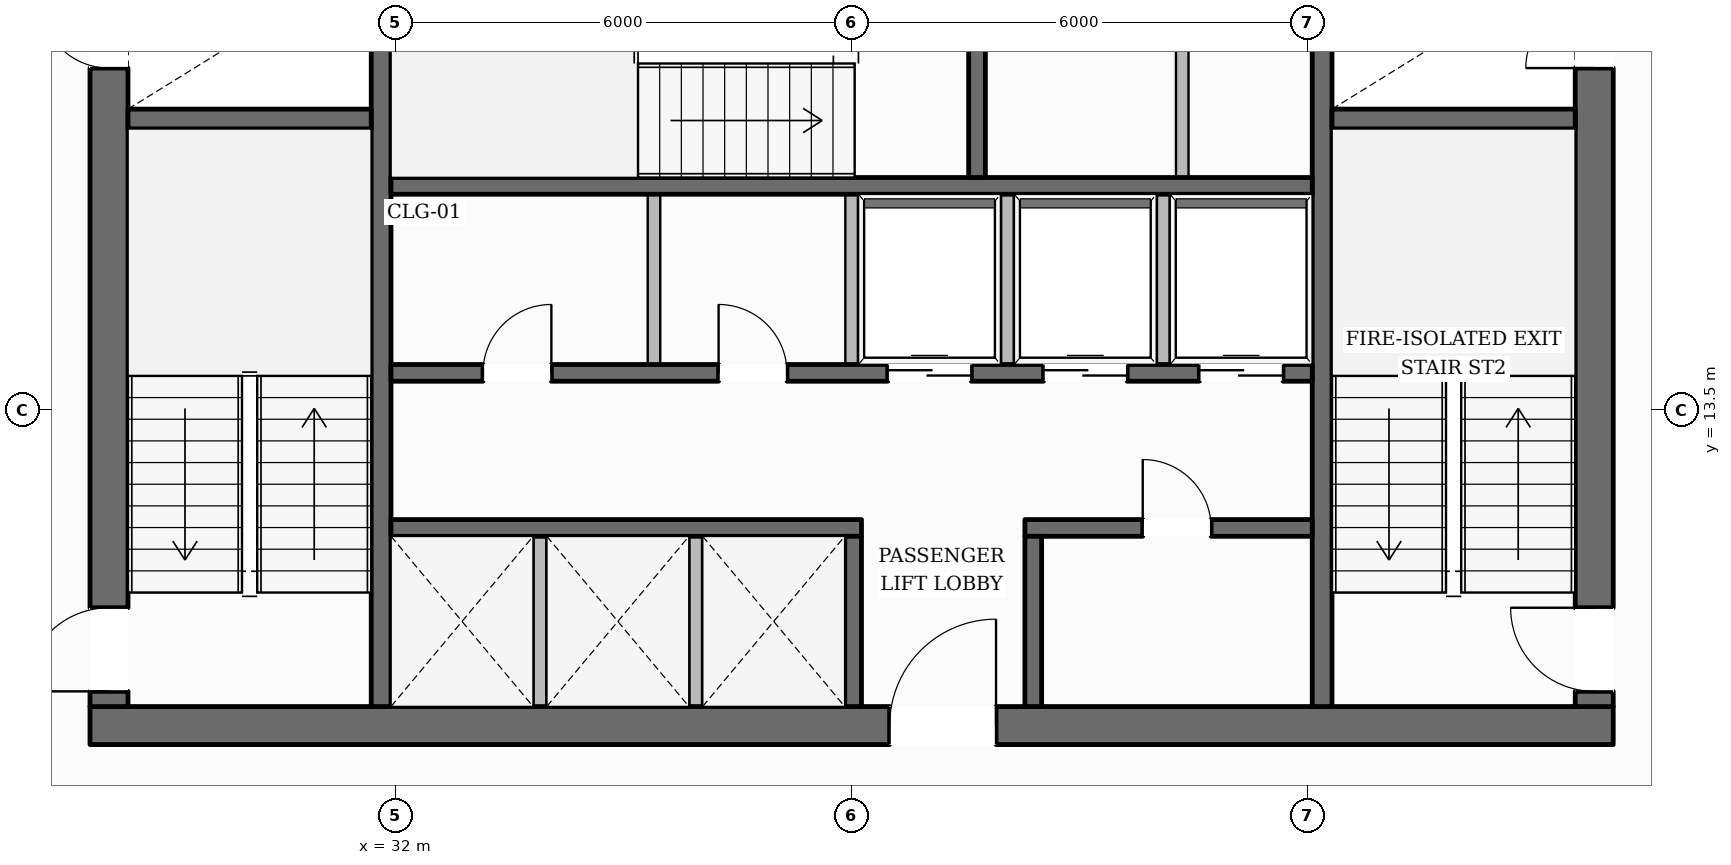
"""IFC4 building model, lengths in metres.
Left out: names, types, materials, properties, quantities, classifications, styles, units other than length and angle.
Written with IfcOpenShell. Run it as: python <this file> out.ifc"""

import sys

from ifc_helpers import new_model, si_unit, direction, frame, frame_2d, origin, place, context, subcontext, project, spatial, rectangle, extrude, element, fill, save


model = new_model("IFC4")
c1 = context("Model", 3, precision=1e-05, world=origin(), true_north=direction((0.0, 1.0)))
c2 = subcontext(c1, "Body", "Model", "MODEL_VIEW")
j1 = project(units=[si_unit("LENGTHUNIT", "METRE"), si_unit("PLANEANGLEUNIT", "RADIAN")], contexts=[c1])
p1 = place(None, origin())
s1 = spatial("IfcSite", under=j1, at=p1, CompositionType="ELEMENT")
p2 = place(p1, origin())
s2 = spatial("IfcBuilding", under=s1, at=p2, CompositionType="ELEMENT")
p3 = place(p2, frame((0.0, 0.0, 116.3)))
s3 = spatial("IfcBuildingStorey", under=s2, at=p3, CompositionType="ELEMENT", Elevation=116.3)
p4 = place(p3, frame((27.98, 9.35, 0.0), z_axis=(0.0, 0.0, 1.0), x_axis=(1.0, 0.0, 0.0)))
e1 = element("IfcWall", 1, at=p4, inside=s3, PredefinedType="SOLIDWALL", context=c2, shape_type="SweptSolid", body=[
    extrude(rectangle(XDim=20.04, YDim=0.5, at=frame_2d((10.02, 0.0))), origin(), (0.0, 0.0, 1.0), 3.6),
])
p5 = place(p4, frame((10.52, 0.0, 0.0)))
e2 = element("IfcOpeningElement", 2, at=p5, cuts=e1, PredefinedType="OPENING", context=c2, shape_type="SweptSolid", body=[
    extrude(rectangle(XDim=1.4, YDim=2.2, at=frame_2d((0.7, 1.1))), frame((0.0, 0.26, 0.0), z_axis=(0.0, -1.0, 0.0), x_axis=(1.0, 0.0, 0.0)), (0.0, 0.0, 1.0), 0.52),
])
p6 = place(p3, frame((28.23, 9.6, 0.0), z_axis=(0.0, 0.0, 1.0), x_axis=(0.0, 1.0, 0.0)))
e3 = element("IfcWall", 3, at=p6, inside=s3, PredefinedType="SOLIDWALL", context=c2, shape_type="SweptSolid", body=[
    extrude(rectangle(XDim=13.0, YDim=0.5, at=frame_2d((6.5, 0.0))), origin(), (0.0, 0.0, 1.0), 3.6),
])
p7 = place(p6, frame((0.2, 0.0, 0.0)))
e4 = element("IfcOpeningElement", 4, at=p7, cuts=e3, PredefinedType="OPENING", context=c2, shape_type="SweptSolid", body=[
    extrude(rectangle(XDim=1.1, YDim=2.15, at=frame_2d((0.55, 1.075))), frame((0.0, 0.26, 0.0), z_axis=(0.0, -1.0, 0.0), x_axis=(1.0, 0.0, 0.0)), (0.0, 0.0, 1.0), 0.52),
])
p8 = place(p6, frame((8.4, 0.0, 0.0)))
e5 = element("IfcOpeningElement", 5, at=p8, cuts=e3, PredefinedType="OPENING", context=c2, shape_type="SweptSolid", body=[
    extrude(rectangle(XDim=0.9, YDim=2.1, at=frame_2d((0.45, 1.05))), frame((0.0, 0.26, 0.0), z_axis=(0.0, -1.0, 0.0), x_axis=(1.0, 0.0, 0.0)), (0.0, 0.0, 1.0), 0.52),
])
p9 = place(p3, frame((47.77, 9.6, 0.0), z_axis=(0.0, 0.0, 1.0), x_axis=(0.0, 1.0, 0.0)))
e6 = element("IfcWall", 6, at=p9, inside=s3, PredefinedType="SOLIDWALL", context=c2, shape_type="SweptSolid", body=[
    extrude(rectangle(XDim=13.0, YDim=0.5, at=frame_2d((6.5, 0.0))), origin(), (0.0, 0.0, 1.0), 3.6),
])
p10 = place(p9, frame((0.2, 0.0, 0.0)))
e7 = element("IfcOpeningElement", 7, at=p10, cuts=e6, PredefinedType="OPENING", context=c2, shape_type="SweptSolid", body=[
    extrude(rectangle(XDim=1.1, YDim=2.15, at=frame_2d((0.55, 1.075))), frame((0.0, 0.26, 0.0), z_axis=(0.0, -1.0, 0.0), x_axis=(1.0, 0.0, 0.0)), (0.0, 0.0, 1.0), 0.52),
])
p11 = place(p9, frame((8.4, 0.0, 0.0)))
e8 = element("IfcOpeningElement", 8, at=p11, cuts=e6, PredefinedType="OPENING", context=c2, shape_type="SweptSolid", body=[
    extrude(rectangle(XDim=0.9, YDim=2.1, at=frame_2d((0.45, 1.05))), frame((0.0, 0.26, 0.0), z_axis=(0.0, -1.0, 0.0), x_axis=(1.0, 0.0, 0.0)), (0.0, 0.0, 1.0), 0.52),
])
p12 = place(p3, frame((31.81, 9.6, 0.0), z_axis=(0.0, 0.0, 1.0), x_axis=(0.0, 1.0, 0.0)))
e9 = element("IfcWall", 9, at=p12, inside=s3, PredefinedType="SHEAR", context=c2, shape_type="SweptSolid", body=[
    extrude(rectangle(XDim=13.0, YDim=0.26, at=frame_2d((6.5, 0.0))), origin(), (0.0, 0.0, 1.0), 3.6),
])
p13 = place(p12, frame((10.925, 0.0, 0.0)))
e10 = element("IfcOpeningElement", 10, at=p13, cuts=e9, PredefinedType="OPENING", context=c2, shape_type="SweptSolid", body=[
    extrude(rectangle(XDim=1.25, YDim=2.25, at=frame_2d((0.625, 1.125))), frame((0.0, 0.14, 0.0), z_axis=(0.0, -1.0, 0.0), x_axis=(1.0, 0.0, 0.0)), (0.0, 0.0, 1.0), 0.28),
])
p14 = place(p3, frame((44.19, 9.6, 0.0), z_axis=(0.0, 0.0, 1.0), x_axis=(0.0, 1.0, 0.0)))
e11 = element("IfcWall", 11, at=p14, inside=s3, PredefinedType="SHEAR", context=c2, shape_type="SweptSolid", body=[
    extrude(rectangle(XDim=13.0, YDim=0.26, at=frame_2d((6.5, 0.0))), origin(), (0.0, 0.0, 1.0), 3.6),
])
p15 = place(p14, frame((10.925, 0.0, 0.0)))
e12 = element("IfcOpeningElement", 12, at=p15, cuts=e11, PredefinedType="OPENING", context=c2, shape_type="SweptSolid", body=[
    extrude(rectangle(XDim=1.25, YDim=2.25, at=frame_2d((0.625, 1.125))), frame((0.0, 0.14, 0.0), z_axis=(0.0, -1.0, 0.0), x_axis=(1.0, 0.0, 0.0)), (0.0, 0.0, 1.0), 0.28),
])
for number, where, z_axis, x_axis in (
    (13, (28.48, 17.33, 0.0), (0.0, 0.0, 1.0), (1.0, 0.0, 0.0)),
    (14, (44.32, 17.33, 0.0), (0.0, 0.0, 1.0), (1.0, 0.0, 0.0)),
):
    element("IfcWall", number, at=place(p3, frame(where, z_axis=z_axis, x_axis=x_axis)), inside=s3, PredefinedType="SHEAR", context=c2, shape_type="SweptSolid", body=[
        extrude(rectangle(XDim=3.2, YDim=0.26, at=frame_2d((1.6, 0.0))), origin(), (0.0, 0.0, 1.0), 3.6),
    ])
p16 = place(p3, frame((31.94, 16.45, 0.0), z_axis=(0.0, 0.0, 1.0), x_axis=(1.0, 0.0, 0.0)))
e15 = element("IfcWall", 15, at=p16, inside=s3, PredefinedType="SOLIDWALL", context=c2, shape_type="SweptSolid", body=[
    extrude(rectangle(XDim=12.12, YDim=0.22, at=frame_2d((6.06, 0.0))), origin(), (0.0, 0.0, 1.0), 3.6),
])
p17 = place(p3, frame((39.65, 16.56, 0.0), z_axis=(0.0, 0.0, 1.0), x_axis=(0.0, 1.0, 0.0)))
e16 = element("IfcWall", 16, at=p17, inside=s3, PredefinedType="SOLIDWALL", context=c2, shape_type="SweptSolid", body=[
    extrude(rectangle(XDim=3.2, YDim=0.22, at=frame_2d((1.6, 0.0))), origin(), (0.0, 0.0, 1.0), 3.6),
])
p18 = place(p3, frame((31.94, 13.99, 0.0), z_axis=(0.0, 0.0, 1.0), x_axis=(1.0, 0.0, 0.0)))
e17 = element("IfcWall", 17, at=p18, inside=s3, PredefinedType="SOLIDWALL", context=c2, shape_type="SweptSolid", body=[
    extrude(rectangle(XDim=12.12, YDim=0.22, at=frame_2d((6.06, 0.0))), origin(), (0.0, 0.0, 1.0), 3.6),
])
p19 = place(p18, frame((1.21, 0.0, 0.0)))
e18 = element("IfcOpeningElement", 18, at=p19, cuts=e17, PredefinedType="OPENING", context=c2, shape_type="SweptSolid", body=[
    extrude(rectangle(XDim=0.9, YDim=2.1, at=frame_2d((0.45, 1.05))), frame((0.0, 0.12, 0.0), z_axis=(0.0, -1.0, 0.0), x_axis=(1.0, 0.0, 0.0)), (0.0, 0.0, 1.0), 0.24),
])
p20 = place(p18, frame((4.31, 0.0, 0.0)))
e19 = element("IfcOpeningElement", 19, at=p20, cuts=e17, PredefinedType="OPENING", context=c2, shape_type="SweptSolid", body=[
    extrude(rectangle(XDim=0.9, YDim=2.1, at=frame_2d((0.45, 1.05))), frame((0.0, 0.12, 0.0), z_axis=(0.0, -1.0, 0.0), x_axis=(1.0, 0.0, 0.0)), (0.0, 0.0, 1.0), 0.24),
])
p21 = place(p18, frame((6.535, 0.0, 0.0)))
e20 = element("IfcOpeningElement", 20, at=p21, cuts=e17, PredefinedType="OPENING", context=c2, shape_type="SweptSolid", body=[
    extrude(rectangle(XDim=1.1, YDim=2.2, at=frame_2d((0.55, 1.1))), frame((0.0, 0.12, 0.0), z_axis=(0.0, -1.0, 0.0), x_axis=(1.0, 0.0, 0.0)), (0.0, 0.0, 1.0), 0.24),
])
p22 = place(p18, frame((8.585, 0.0, 0.0)))
e21 = element("IfcOpeningElement", 21, at=p22, cuts=e17, PredefinedType="OPENING", context=c2, shape_type="SweptSolid", body=[
    extrude(rectangle(XDim=1.1, YDim=2.2, at=frame_2d((0.55, 1.1))), frame((0.0, 0.12, 0.0), z_axis=(0.0, -1.0, 0.0), x_axis=(1.0, 0.0, 0.0)), (0.0, 0.0, 1.0), 0.24),
])
p23 = place(p18, frame((10.635, 0.0, 0.0)))
e22 = element("IfcOpeningElement", 22, at=p23, cuts=e17, PredefinedType="OPENING", context=c2, shape_type="SweptSolid", body=[
    extrude(rectangle(XDim=1.1, YDim=2.2, at=frame_2d((0.55, 1.1))), frame((0.0, 0.12, 0.0), z_axis=(0.0, -1.0, 0.0), x_axis=(1.0, 0.0, 0.0)), (0.0, 0.0, 1.0), 0.24),
])
p24 = place(p3, frame((31.94, 11.95, 0.0), z_axis=(0.0, 0.0, 1.0), x_axis=(1.0, 0.0, 0.0)))
e23 = element("IfcWall", 23, at=p24, inside=s3, PredefinedType="SOLIDWALL", context=c2, shape_type="SweptSolid", body=[
    extrude(rectangle(XDim=6.19, YDim=0.22, at=frame_2d((3.095, 0.0))), origin(), (0.0, 0.0, 1.0), 3.6),
])
p25 = place(p3, frame((40.28, 11.95, 0.0), z_axis=(0.0, 0.0, 1.0), x_axis=(1.0, 0.0, 0.0)))
e24 = element("IfcWall", 24, at=p25, inside=s3, PredefinedType="SOLIDWALL", context=c2, shape_type="SweptSolid", body=[
    extrude(rectangle(XDim=3.78, YDim=0.22, at=frame_2d((1.89, 0.0))), origin(), (0.0, 0.0, 1.0), 3.6),
])
p26 = place(p25, frame((1.55, 0.0, 0.0)))
e25 = element("IfcOpeningElement", 25, at=p26, cuts=e24, PredefinedType="OPENING", context=c2, shape_type="SweptSolid", body=[
    extrude(rectangle(XDim=0.9, YDim=2.1, at=frame_2d((0.45, 1.05))), frame((0.0, 0.12, 0.0), z_axis=(0.0, -1.0, 0.0), x_axis=(1.0, 0.0, 0.0)), (0.0, 0.0, 1.0), 0.24),
])
for number, where, z_axis, x_axis in (
    (26, (38.02, 9.6, 0.0), (0.0, 0.0, 1.0), (0.0, 1.0, 0.0)),
    (27, (40.39, 9.6, 0.0), (0.0, 0.0, 1.0), (0.0, 1.0, 0.0)),
):
    element("IfcWall", number, at=place(p3, frame(where, z_axis=z_axis, x_axis=x_axis)), inside=s3, PredefinedType="SOLIDWALL", context=c2, shape_type="SweptSolid", body=[
        extrude(rectangle(XDim=2.24, YDim=0.22, at=frame_2d((1.12, 0.0))), origin(), (0.0, 0.0, 1.0), 3.6),
    ])
p27 = place(p3, frame((14.08, 13.052, 0.0), z_axis=(0.0, 0.0, 1.0), x_axis=(0.496744930326, 0.867896580357, 0.0)))
e28 = element("IfcWall", 28, at=p27, inside=s3, PredefinedType="STANDARD", context=c2, shape_type="SweptSolid", body=[
    extrude(rectangle(XDim=36.351, YDim=0.38, at=frame_2d((18.175, 0.0))), origin(), (0.0, 0.0, 1.0), 3.059),
])
p28 = place(p27, frame((32.146, 0.0, 0.65)))
e29 = element("IfcOpeningElement", 29, at=p28, cuts=e28, PredefinedType="OPENING", context=c2, shape_type="SweptSolid", body=[
    extrude(rectangle(XDim=1.55, YDim=1.75, at=frame_2d((0.775, 0.875))), frame((0.0, 0.2, 0.0), z_axis=(0.0, -1.0, 0.0), x_axis=(1.0, 0.0, 0.0)), (0.0, 0.0, 1.0), 0.4),
])
p29 = place(p27, frame((26.247, 0.0, 0.65)))
e30 = element("IfcOpeningElement", 30, at=p29, cuts=e28, PredefinedType="OPENING", context=c2, shape_type="SweptSolid", body=[
    extrude(rectangle(XDim=1.55, YDim=1.75, at=frame_2d((0.775, 0.875))), frame((0.0, 0.2, 0.0), z_axis=(0.0, -1.0, 0.0), x_axis=(1.0, 0.0, 0.0)), (0.0, 0.0, 1.0), 0.4),
])
p30 = place(p27, frame((14.449, 0.0, 0.65)))
e31 = element("IfcOpeningElement", 31, at=p30, cuts=e28, PredefinedType="OPENING", context=c2, shape_type="SweptSolid", body=[
    extrude(rectangle(XDim=1.55, YDim=1.75, at=frame_2d((0.775, 0.875))), frame((0.0, 0.2, 0.0), z_axis=(0.0, -1.0, 0.0), x_axis=(1.0, 0.0, 0.0)), (0.0, 0.0, 1.0), 0.4),
])
p31 = place(p27, frame((8.55, 0.0, 0.65)))
e32 = element("IfcOpeningElement", 32, at=p31, cuts=e28, PredefinedType="OPENING", context=c2, shape_type="SweptSolid", body=[
    extrude(rectangle(XDim=1.55, YDim=1.75, at=frame_2d((0.775, 0.875))), frame((0.0, 0.2, 0.0), z_axis=(0.0, -1.0, 0.0), x_axis=(1.0, 0.0, 0.0)), (0.0, 0.0, 1.0), 0.4),
])
p32 = place(p27, frame((2.652, 0.0, 0.65)))
e33 = element("IfcOpeningElement", 33, at=p32, cuts=e28, PredefinedType="OPENING", context=c2, shape_type="SweptSolid", body=[
    extrude(rectangle(XDim=1.55, YDim=1.75, at=frame_2d((0.775, 0.875))), frame((0.0, 0.2, 0.0), z_axis=(0.0, -1.0, 0.0), x_axis=(1.0, 0.0, 0.0)), (0.0, 0.0, 1.0), 0.4),
])
p33 = place(p3, frame((44.024, 44.506, 0.0), z_axis=(0.0, 0.0, 1.0), x_axis=(0.503202137133, -0.864168738838, 0.0)))
e34 = element("IfcWall", 34, at=p33, inside=s3, PredefinedType="STANDARD", context=c2, shape_type="SweptSolid", body=[
    extrude(rectangle(XDim=36.818, YDim=0.38, at=frame_2d((18.409, 0.0))), origin(), (0.0, 0.0, 1.0), 3.059),
])
p34 = place(p33, frame((32.577, 0.0, 0.65)))
e35 = element("IfcOpeningElement", 35, at=p34, cuts=e34, PredefinedType="OPENING", context=c2, shape_type="SweptSolid", body=[
    extrude(rectangle(XDim=1.55, YDim=1.75, at=frame_2d((0.775, 0.875))), frame((0.0, 0.2, 0.0), z_axis=(0.0, -1.0, 0.0), x_axis=(1.0, 0.0, 0.0)), (0.0, 0.0, 1.0), 0.4),
])
p35 = place(p33, frame((26.599, 0.0, 0.65)))
e36 = element("IfcOpeningElement", 36, at=p35, cuts=e34, PredefinedType="OPENING", context=c2, shape_type="SweptSolid", body=[
    extrude(rectangle(XDim=1.55, YDim=1.75, at=frame_2d((0.775, 0.875))), frame((0.0, 0.2, 0.0), z_axis=(0.0, -1.0, 0.0), x_axis=(1.0, 0.0, 0.0)), (0.0, 0.0, 1.0), 0.4),
])
p36 = place(p33, frame((14.643, 0.0, 0.65)))
e37 = element("IfcOpeningElement", 37, at=p36, cuts=e34, PredefinedType="OPENING", context=c2, shape_type="SweptSolid", body=[
    extrude(rectangle(XDim=1.55, YDim=1.75, at=frame_2d((0.775, 0.875))), frame((0.0, 0.2, 0.0), z_axis=(0.0, -1.0, 0.0), x_axis=(1.0, 0.0, 0.0)), (0.0, 0.0, 1.0), 0.4),
])
p37 = place(p33, frame((8.665, 0.0, 0.65)))
e38 = element("IfcOpeningElement", 38, at=p37, cuts=e34, PredefinedType="OPENING", context=c2, shape_type="SweptSolid", body=[
    extrude(rectangle(XDim=1.55, YDim=1.75, at=frame_2d((0.775, 0.875))), frame((0.0, 0.2, 0.0), z_axis=(0.0, -1.0, 0.0), x_axis=(1.0, 0.0, 0.0)), (0.0, 0.0, 1.0), 0.4),
])
p38 = place(p33, frame((2.688, 0.0, 0.65)))
e39 = element("IfcOpeningElement", 39, at=p38, cuts=e34, PredefinedType="OPENING", context=c2, shape_type="SweptSolid", body=[
    extrude(rectangle(XDim=1.55, YDim=1.75, at=frame_2d((0.775, 0.875))), frame((0.0, 0.2, 0.0), z_axis=(0.0, -1.0, 0.0), x_axis=(1.0, 0.0, 0.0)), (0.0, 0.0, 1.0), 0.4),
])
for number, where, z_axis, x_axis in (
    (40, (33.9, 9.55, 0.0), (0.0, 0.0, 1.0), (0.0, 1.0, 0.0)),
    (41, (35.95, 9.55, 0.0), (0.0, 0.0, 1.0), (0.0, 1.0, 0.0)),
):
    element("IfcWall", number, at=place(p3, frame(where, z_axis=z_axis, x_axis=x_axis)), inside=s3, PredefinedType="PARTITIONING", context=c2, shape_type="SweptSolid", body=[
        extrude(rectangle(XDim=2.29, YDim=0.165, at=frame_2d((1.145, 0.0))), origin(), (0.0, 0.0, 1.0), 3.6),
    ])
for number, where, z_axis, x_axis in (
    (42, (38.0, 14.1, 0.0), (0.0, 0.0, 1.0), (0.0, 1.0, 0.0)),
    (43, (35.4, 14.1, 0.0), (0.0, 0.0, 1.0), (0.0, 1.0, 0.0)),
    (44, (40.05, 14.1, 0.0), (0.0, 0.0, 1.0), (0.0, 1.0, 0.0)),
    (45, (42.1, 14.1, 0.0), (0.0, 0.0, 1.0), (0.0, 1.0, 0.0)),
):
    element("IfcWall", number, at=place(p3, frame(where, z_axis=z_axis, x_axis=x_axis)), inside=s3, PredefinedType="PARTITIONING", context=c2, shape_type="SweptSolid", body=[
        extrude(rectangle(XDim=2.24, YDim=0.165, at=frame_2d((1.12, 0.0))), origin(), (0.0, 0.0, 1.0), 3.6),
    ])
p39 = place(p3, frame((42.35, 16.56, 0.0), z_axis=(0.0, 0.0, 1.0), x_axis=(0.0, 1.0, 0.0)))
e46 = element("IfcWall", 46, at=p39, inside=s3, PredefinedType="PARTITIONING", context=c2, shape_type="SweptSolid", body=[
    extrude(rectangle(XDim=3.2, YDim=0.165, at=frame_2d((1.6, 0.0))), origin(), (0.0, 0.0, 1.0), 3.6),
])
p40 = place(p3, frame((18.646, 9.796, 0.0), z_axis=(0.0, 0.0, 1.0), x_axis=(0.931196254874, -0.364518223014, 0.0)))
e47 = element("IfcWall", 47, at=p40, inside=s3, PredefinedType="PARTITIONING", context=c2, shape_type="SweptSolid", body=[
    extrude(rectangle(XDim=19.359, YDim=0.125, at=frame_2d((9.679, 0.0))), origin(), (0.0, 0.0, 1.0), 3.062),
])
p41 = place(p40, frame((9.963, 0.0, 0.0)))
e48 = element("IfcOpeningElement", 48, at=p41, cuts=e47, PredefinedType="OPENING", context=c2, shape_type="SweptSolid", body=[
    extrude(rectangle(XDim=0.98, YDim=2.15, at=frame_2d((0.49, 1.075))), frame((0.0, 0.073, 0.0), z_axis=(0.0, -1.0, 0.0), x_axis=(1.0, 0.0, 0.0)), (0.0, 0.0, 1.0), 0.145),
])
p42 = place(p7, origin())
e49 = element("IfcDoor", 49, at=p42, inside=s3, OperationType="SINGLE_SWING_LEFT", PredefinedType="DOOR", context=c2, shape_type="SweptSolid", body=[
    extrude(rectangle(XDim=1.1, YDim=2.15, at=frame_2d((0.55, 1.075))), frame((0.0, 0.025, 0.0), z_axis=(0.0, -1.0, 0.0), x_axis=(1.0, 0.0, 0.0)), (0.0, 0.0, 1.0), 0.05),
])
fill(e4, e49)
p43 = place(p10, origin())
e50 = element("IfcDoor", 50, at=p43, inside=s3, OperationType="SINGLE_SWING_RIGHT", PredefinedType="DOOR", context=c2, shape_type="SweptSolid", body=[
    extrude(rectangle(XDim=1.1, YDim=2.15, at=frame_2d((0.55, 1.075))), frame((0.0, 0.025, 0.0), z_axis=(0.0, -1.0, 0.0), x_axis=(1.0, 0.0, 0.0)), (0.0, 0.0, 1.0), 0.05),
])
fill(e7, e50)
p44 = place(p8, origin())
e51 = element("IfcDoor", 51, at=p44, inside=s3, OperationType="SINGLE_SWING_RIGHT", PredefinedType="DOOR", context=c2, shape_type="SweptSolid", body=[
    extrude(rectangle(XDim=0.9, YDim=2.1, at=frame_2d((0.45, 1.05))), frame((0.0, 0.025, 0.0), z_axis=(0.0, -1.0, 0.0), x_axis=(1.0, 0.0, 0.0)), (0.0, 0.0, 1.0), 0.05),
])
fill(e5, e51)
p45 = place(p11, origin())
e52 = element("IfcDoor", 52, at=p45, inside=s3, OperationType="SINGLE_SWING_LEFT", PredefinedType="DOOR", context=c2, shape_type="SweptSolid", body=[
    extrude(rectangle(XDim=0.9, YDim=2.1, at=frame_2d((0.45, 1.05))), frame((0.0, 0.025, 0.0), z_axis=(0.0, -1.0, 0.0), x_axis=(1.0, 0.0, 0.0)), (0.0, 0.0, 1.0), 0.05),
])
fill(e8, e52)
p46 = place(p5, origin())
e53 = element("IfcDoor", 53, at=p46, inside=s3, OperationType="SINGLE_SWING_RIGHT", PredefinedType="DOOR", context=c2, shape_type="SweptSolid", body=[
    extrude(rectangle(XDim=1.4, YDim=2.2, at=frame_2d((0.7, 1.1))), frame((0.0, 0.025, 0.0), z_axis=(0.0, -1.0, 0.0), x_axis=(1.0, 0.0, 0.0)), (0.0, 0.0, 1.0), 0.05),
])
fill(e2, e53)
p47 = place(p19, origin())
e54 = element("IfcDoor", 54, at=p47, inside=s3, OperationType="SINGLE_SWING_RIGHT", PredefinedType="DOOR", context=c2, shape_type="SweptSolid", body=[
    extrude(rectangle(XDim=0.9, YDim=2.1, at=frame_2d((0.45, 1.05))), frame((0.0, 0.025, 0.0), z_axis=(0.0, -1.0, 0.0), x_axis=(1.0, 0.0, 0.0)), (0.0, 0.0, 1.0), 0.05),
])
fill(e18, e54)
p48 = place(p20, origin())
e55 = element("IfcDoor", 55, at=p48, inside=s3, OperationType="SINGLE_SWING_LEFT", PredefinedType="DOOR", context=c2, shape_type="SweptSolid", body=[
    extrude(rectangle(XDim=0.9, YDim=2.1, at=frame_2d((0.45, 1.05))), frame((0.0, 0.025, 0.0), z_axis=(0.0, -1.0, 0.0), x_axis=(1.0, 0.0, 0.0)), (0.0, 0.0, 1.0), 0.05),
])
fill(e19, e55)
p49 = place(p21, origin())
e56 = element("IfcDoor", 56, at=p49, inside=s3, OperationType="DOUBLE_DOOR_SLIDING", PredefinedType="DOOR", context=c2, shape_type="SweptSolid", body=[
    extrude(rectangle(XDim=1.1, YDim=2.2, at=frame_2d((0.55, 1.1))), frame((0.0, 0.025, 0.0), z_axis=(0.0, -1.0, 0.0), x_axis=(1.0, 0.0, 0.0)), (0.0, 0.0, 1.0), 0.05),
])
fill(e20, e56)
p50 = place(p22, origin())
e57 = element("IfcDoor", 57, at=p50, inside=s3, OperationType="DOUBLE_DOOR_SLIDING", PredefinedType="DOOR", context=c2, shape_type="SweptSolid", body=[
    extrude(rectangle(XDim=1.1, YDim=2.2, at=frame_2d((0.55, 1.1))), frame((0.0, 0.025, 0.0), z_axis=(0.0, -1.0, 0.0), x_axis=(1.0, 0.0, 0.0)), (0.0, 0.0, 1.0), 0.05),
])
fill(e21, e57)
p51 = place(p23, origin())
e58 = element("IfcDoor", 58, at=p51, inside=s3, OperationType="DOUBLE_DOOR_SLIDING", PredefinedType="DOOR", context=c2, shape_type="SweptSolid", body=[
    extrude(rectangle(XDim=1.1, YDim=2.2, at=frame_2d((0.55, 1.1))), frame((0.0, 0.025, 0.0), z_axis=(0.0, -1.0, 0.0), x_axis=(1.0, 0.0, 0.0)), (0.0, 0.0, 1.0), 0.05),
])
fill(e22, e58)
p52 = place(p26, origin())
e59 = element("IfcDoor", 59, at=p52, inside=s3, OperationType="SINGLE_SWING_LEFT", PredefinedType="DOOR", context=c2, shape_type="SweptSolid", body=[
    extrude(rectangle(XDim=0.9, YDim=2.1, at=frame_2d((0.45, 1.05))), frame((0.0, 0.025, 0.0), z_axis=(0.0, -1.0, 0.0), x_axis=(1.0, 0.0, 0.0)), (0.0, 0.0, 1.0), 0.05),
])
fill(e25, e59)
save(model, sys.argv[1])
